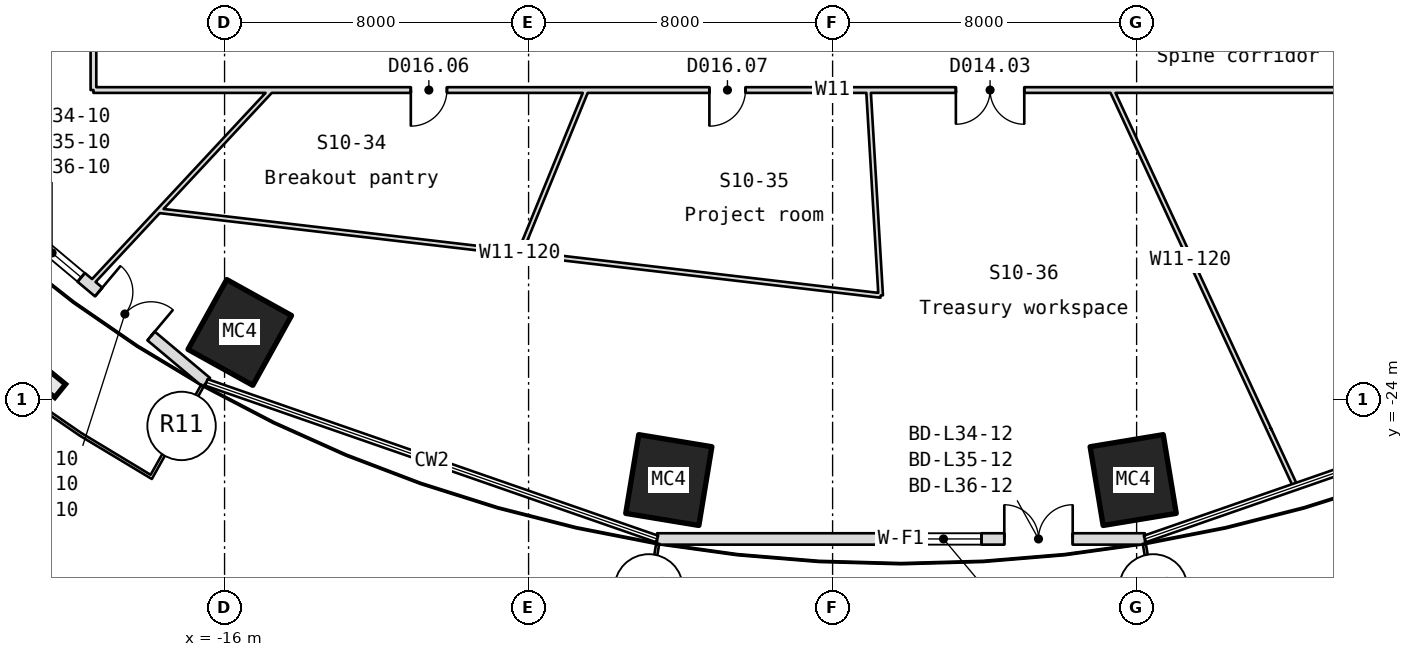
"""IFC4 building model, lengths in metres.
Left out: names, types, materials, properties, quantities, classifications, styles, units other than length and angle.
Written with IfcOpenShell. Run it as: python <this file> out.ifc"""

import sys

from ifc_helpers import new_model, si_unit, direction, frame, frame_2d, origin, origin_2d, place, context, subcontext, project, spatial, rectangle, hollow_rectangle, extrude, element, fill, save


model = new_model("IFC4")
c1 = context("Model", 3, precision=1e-05, world=origin(), true_north=direction((0.0, 1.0)))
c2 = subcontext(c1, "Body", "Model", "MODEL_VIEW")
j1 = project(units=[si_unit("LENGTHUNIT", "METRE"), si_unit("PLANEANGLEUNIT", "RADIAN")], contexts=[c1])
p1 = place(None, origin())
s1 = spatial("IfcSite", under=j1, at=p1, CompositionType="ELEMENT")
p2 = place(p1, origin())
s2 = spatial("IfcBuilding", under=s1, at=p2, CompositionType="ELEMENT")
p3 = place(p2, frame((0.0, 0.0, 161.05)))
s3 = spatial("IfcBuildingStorey", under=s2, at=p3, CompositionType="ELEMENT", Elevation=161.05)
for number, where, z_axis, x_axis in (
    (1, (-15.6, -22.228, -0.18), (0.0, 0.0, 1.0), (-0.874, 0.485, 0.0)),
    (2, (-4.31, -26.112, -0.18), (0.0, 0.0, 1.0), (-0.987, 0.163, 0.0)),
    (3, (7.91, -26.112, -0.18), (0.0, 0.0, 1.0), (-0.987, -0.163, 0.0)),
):
    element("IfcColumn", number, at=place(p3, frame(where, z_axis=z_axis, x_axis=x_axis)), inside=s3, PredefinedType="COLUMN", context=c2, shape_type="SweptSolid", body=[
        extrude(hollow_rectangle(XDim=1.95, YDim=2.1, WallThickness=0.075, at=origin_2d()), origin(), (0.0, 0.0, 1.0), 4.15),
    ])
p4 = place(p3, frame((-25.554, -15.929, 0.0), z_axis=(0.0, 0.0, 1.0), x_axis=(0.766186960617, -0.642617725697, 0.0)))
e4 = element("IfcWall", 4, at=p4, inside=s3, PredefinedType="SOLIDWALL", context=c2, shape_type="SweptSolid", body=[
    extrude(rectangle(XDim=11.846, YDim=0.3, at=frame_2d((5.923, 0.0))), origin(), (0.0, 0.0, 1.0), 3.97),
])
p5 = place(p4, frame((8.146, 0.0, 0.0)))
e5 = element("IfcOpeningElement", 5, at=p5, cuts=e4, PredefinedType="OPENING", context=c2, shape_type="SweptSolid", body=[
    extrude(rectangle(XDim=1.8, YDim=2.4, at=frame_2d((0.9, 1.2))), frame((0.0, 0.16, 0.0), z_axis=(0.0, -1.0, 0.0), x_axis=(1.0, 0.0, 0.0)), (0.0, 0.0, 1.0), 0.32),
])
p6 = place(p4, frame((5.546, 0.0, 0.9)))
e6 = element("IfcOpeningElement", 6, at=p6, cuts=e4, PredefinedType="OPENING", context=c2, shape_type="SweptSolid", body=[
    extrude(rectangle(XDim=2.0, YDim=1.5, at=frame_2d((1.0, 0.75))), frame((0.0, 0.16, 0.0), z_axis=(0.0, -1.0, 0.0), x_axis=(1.0, 0.0, 0.0)), (0.0, 0.0, 1.0), 0.32),
])
p7 = place(p3, frame((-4.618, -27.662, 0.0), z_axis=(0.0, 0.0, 1.0), x_axis=(1.0, 0.0, 0.0)))
e7 = element("IfcWall", 7, at=p7, inside=s3, PredefinedType="SOLIDWALL", context=c2, shape_type="SweptSolid", body=[
    extrude(rectangle(XDim=12.837, YDim=0.3, at=frame_2d((6.418, 0.0))), origin(), (0.0, 0.0, 1.0), 3.97),
])
p8 = place(p7, frame((9.137, 0.0, 0.0)))
e8 = element("IfcOpeningElement", 8, at=p8, cuts=e7, PredefinedType="OPENING", context=c2, shape_type="SweptSolid", body=[
    extrude(rectangle(XDim=1.8, YDim=2.4, at=frame_2d((0.9, 1.2))), frame((0.0, 0.16, 0.0), z_axis=(0.0, -1.0, 0.0), x_axis=(1.0, 0.0, 0.0)), (0.0, 0.0, 1.0), 0.32),
])
p9 = place(p7, frame((6.537, 0.0, 0.9)))
e9 = element("IfcOpeningElement", 9, at=p9, cuts=e7, PredefinedType="OPENING", context=c2, shape_type="SweptSolid", body=[
    extrude(rectangle(XDim=2.0, YDim=1.5, at=frame_2d((1.0, 0.75))), frame((0.0, 0.16, 0.0), z_axis=(0.0, -1.0, 0.0), x_axis=(1.0, 0.0, 0.0)), (0.0, 0.0, 1.0), 0.32),
])
p10 = place(p3, frame((-19.45, -15.85, 0.0), z_axis=(0.0, 0.0, 1.0), x_axis=(0.0, 1.0, 0.0)))
e10 = element("IfcWall", 10, at=p10, inside=s3, PredefinedType="PARTITIONING", context=c2, shape_type="SweptSolid", body=[
    extrude(rectangle(XDim=31.582, YDim=0.15, at=frame_2d((15.791, 0.0))), origin(), (0.0, 0.0, 1.0), 3.97),
])
p11 = place(p10, frame((14.003, 0.0, 0.0)))
e11 = element("IfcOpeningElement", 11, at=p11, cuts=e10, PredefinedType="OPENING", context=c2, shape_type="SweptSolid", body=[
    extrude(rectangle(XDim=1.8, YDim=2.1, at=frame_2d((0.9, 1.05))), frame((0.0, 0.085, 0.0), z_axis=(0.0, -1.0, 0.0), x_axis=(1.0, 0.0, 0.0)), (0.0, 0.0, 1.0), 0.17),
])
p12 = place(p3, frame((-17.729, -19.025, 0.0), z_axis=(0.0, 0.0, 1.0), x_axis=(0.99318471995, -0.116550899001, 0.0)))
e12 = element("IfcWall", 12, at=p12, inside=s3, PredefinedType="PARTITIONING", context=c2, shape_type="SweptSolid", body=[
    extrude(rectangle(XDim=19.125, YDim=0.12, at=frame_2d((9.562, 0.0))), origin(), (0.0, 0.0, 1.0), 3.97),
])
p13 = place(p3, frame((-14.77, -15.85, 0.0), z_axis=(0.0, 0.0, 1.0), x_axis=(-0.681748932873, -0.731586216742, 0.0)))
e13 = element("IfcWall", 13, at=p13, inside=s3, PredefinedType="PARTITIONING", context=c2, shape_type="SweptSolid", body=[
    extrude(rectangle(XDim=7.0, YDim=0.12, at=frame_2d((3.5, 0.0))), origin(), (0.0, 0.0, 1.0), 3.97),
])
p14 = place(p3, frame((-8.232, -20.14, 0.0), z_axis=(0.0, 0.0, 1.0), x_axis=(0.378310762155, 0.925678652253, 0.0)))
e14 = element("IfcWall", 14, at=p14, inside=s3, PredefinedType="PARTITIONING", context=c2, shape_type="SweptSolid", body=[
    extrude(rectangle(XDim=4.634, YDim=0.12, at=frame_2d((2.317, 0.0))), origin(), (0.0, 0.0, 1.0), 3.97),
])
p15 = place(p3, frame((1.265, -21.254, 0.0), z_axis=(0.0, 0.0, 1.0), x_axis=(-0.059435758529, 0.998232132627, 0.0)))
e15 = element("IfcWall", 15, at=p15, inside=s3, PredefinedType="PARTITIONING", context=c2, shape_type="SweptSolid", body=[
    extrude(rectangle(XDim=5.414, YDim=0.12, at=frame_2d((2.707, 0.0))), origin(), (0.0, 0.0, 1.0), 3.97),
])
p16 = place(p3, frame((7.345, -15.85, 0.0), z_axis=(0.0, 0.0, 1.0), x_axis=(0.420462507065, -0.90730991406, 0.0)))
e16 = element("IfcWall", 16, at=p16, inside=s3, PredefinedType="PARTITIONING", context=c2, shape_type="SweptSolid", body=[
    extrude(rectangle(XDim=9.841, YDim=0.12, at=frame_2d((4.921, 0.0))), origin(), (0.0, 0.0, 1.0), 3.426),
])
p17 = place(p3, frame((11.483, -24.779, 0.0), z_axis=(0.0, 0.0, 1.0), x_axis=(0.420419662211, -0.90732976785, 0.0)))
e17 = element("IfcWall", 17, at=p17, inside=s3, PredefinedType="PARTITIONING", context=c2, shape_type="SweptSolid", body=[
    extrude(rectangle(XDim=1.66, YDim=0.12, at=frame_2d((0.83, 0.0))), origin(), (0.0, 0.0, 1.0), 3.97),
])
p18 = place(p3, frame((19.45, -15.85, 0.0), z_axis=(0.0, 0.0, 1.0), x_axis=(-1.0, 0.0, 0.0)))
e18 = element("IfcWall", 18, at=p18, inside=s3, PredefinedType="PARTITIONING", context=c2, shape_type="SweptSolid", body=[
    extrude(rectangle(XDim=38.9, YDim=0.15, at=frame_2d((19.45, 0.0))), origin(), (0.0, 0.0, 1.0), 3.97),
])
p19 = place(p18, frame((29.599, 0.0, 0.0)))
e19 = element("IfcOpeningElement", 19, at=p19, cuts=e18, PredefinedType="OPENING", context=c2, shape_type="SweptSolid", body=[
    extrude(rectangle(XDim=0.95, YDim=2.1, at=frame_2d((0.475, 1.05))), frame((0.0, 0.085, 0.0), z_axis=(0.0, -1.0, 0.0), x_axis=(1.0, 0.0, 0.0)), (0.0, 0.0, 1.0), 0.17),
])
p20 = place(p18, frame((21.742, 0.0, 0.0)))
e20 = element("IfcOpeningElement", 20, at=p20, cuts=e18, PredefinedType="OPENING", context=c2, shape_type="SweptSolid", body=[
    extrude(rectangle(XDim=0.95, YDim=2.1, at=frame_2d((0.475, 1.05))), frame((0.0, 0.085, 0.0), z_axis=(0.0, -1.0, 0.0), x_axis=(1.0, 0.0, 0.0)), (0.0, 0.0, 1.0), 0.17),
])
p21 = place(p18, frame((14.406, 0.0, 0.0)))
e21 = element("IfcOpeningElement", 21, at=p21, cuts=e18, PredefinedType="OPENING", context=c2, shape_type="SweptSolid", body=[
    extrude(rectangle(XDim=1.8, YDim=2.1, at=frame_2d((0.9, 1.05))), frame((0.0, 0.085, 0.0), z_axis=(0.0, -1.0, 0.0), x_axis=(1.0, 0.0, 0.0)), (0.0, 0.0, 1.0), 0.17),
])
p22 = place(p5, origin())
e22 = element("IfcDoor", 22, at=p22, inside=s3, OperationType="SINGLE_SWING_LEFT", PredefinedType="DOOR", context=c2, shape_type="SweptSolid", body=[
    extrude(rectangle(XDim=1.8, YDim=2.4, at=frame_2d((0.9, 1.2))), frame((0.0, 0.025, 0.0), z_axis=(0.0, -1.0, 0.0), x_axis=(1.0, 0.0, 0.0)), (0.0, 0.0, 1.0), 0.05),
])
fill(e5, e22)
p23 = place(p6, origin())
e23 = element("IfcWindow", 23, at=p23, inside=s3, PartitioningType="SINGLE_PANEL", PredefinedType="WINDOW", context=c2, shape_type="SweptSolid", body=[
    extrude(rectangle(XDim=2.0, YDim=1.5, at=frame_2d((1.0, 0.75))), frame((0.0, 0.03, 0.0), z_axis=(0.0, -1.0, 0.0), x_axis=(1.0, 0.0, 0.0)), (0.0, 0.0, 1.0), 0.06),
])
fill(e6, e23)
p24 = place(p8, origin())
e24 = element("IfcDoor", 24, at=p24, inside=s3, OperationType="SINGLE_SWING_LEFT", PredefinedType="DOOR", context=c2, shape_type="SweptSolid", body=[
    extrude(rectangle(XDim=1.8, YDim=2.4, at=frame_2d((0.9, 1.2))), frame((0.0, 0.025, 0.0), z_axis=(0.0, -1.0, 0.0), x_axis=(1.0, 0.0, 0.0)), (0.0, 0.0, 1.0), 0.05),
])
fill(e8, e24)
p25 = place(p9, origin())
e25 = element("IfcWindow", 25, at=p25, inside=s3, PartitioningType="SINGLE_PANEL", PredefinedType="WINDOW", context=c2, shape_type="SweptSolid", body=[
    extrude(rectangle(XDim=2.0, YDim=1.5, at=frame_2d((1.0, 0.75))), frame((0.0, 0.03, 0.0), z_axis=(0.0, -1.0, 0.0), x_axis=(1.0, 0.0, 0.0)), (0.0, 0.0, 1.0), 0.06),
])
fill(e9, e25)
p26 = place(p19, origin())
e26 = element("IfcDoor", 26, at=p26, inside=s3, OperationType="SINGLE_SWING_RIGHT", PredefinedType="DOOR", context=c2, shape_type="SweptSolid", body=[
    extrude(rectangle(XDim=0.95, YDim=2.1, at=frame_2d((0.475, 1.05))), frame((0.0, 0.025, 0.0), z_axis=(0.0, -1.0, 0.0), x_axis=(1.0, 0.0, 0.0)), (0.0, 0.0, 1.0), 0.05),
])
fill(e19, e26)
p27 = place(p20, origin())
e27 = element("IfcDoor", 27, at=p27, inside=s3, OperationType="SINGLE_SWING_RIGHT", PredefinedType="DOOR", context=c2, shape_type="SweptSolid", body=[
    extrude(rectangle(XDim=0.95, YDim=2.1, at=frame_2d((0.475, 1.05))), frame((0.0, 0.025, 0.0), z_axis=(0.0, -1.0, 0.0), x_axis=(1.0, 0.0, 0.0)), (0.0, 0.0, 1.0), 0.05),
])
fill(e20, e27)
p28 = place(p21, origin())
e28 = element("IfcDoor", 28, at=p28, inside=s3, OperationType="DOUBLE_DOOR_SINGLE_SWING", PredefinedType="DOOR", context=c2, shape_type="SweptSolid", body=[
    extrude(rectangle(XDim=1.8, YDim=2.1, at=frame_2d((0.9, 1.05))), frame((0.0, 0.025, 0.0), z_axis=(0.0, -1.0, 0.0), x_axis=(1.0, 0.0, 0.0)), (0.0, 0.0, 1.0), 0.05),
])
fill(e21, e28)
save(model, sys.argv[1])
